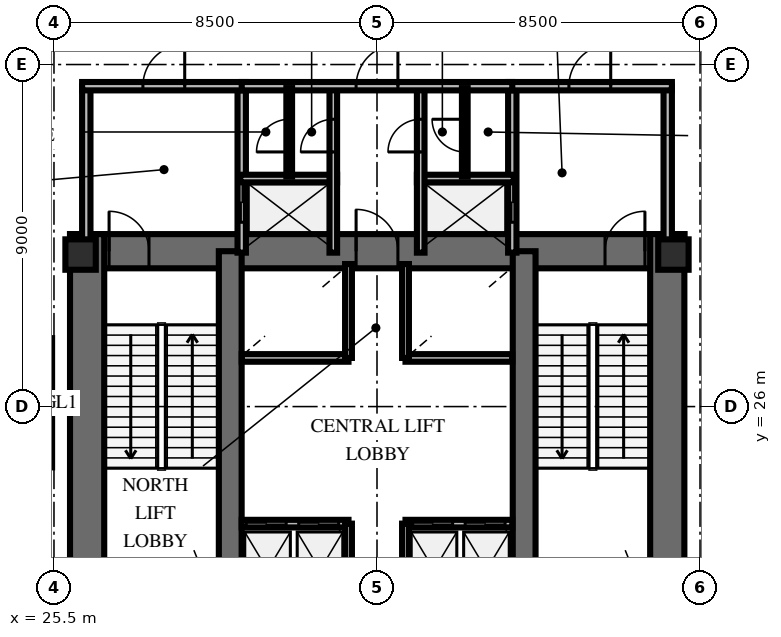
"""IFC4 building model, lengths in metres.
Left out: names, types, materials, properties, quantities, classifications, styles, units other than length and angle.
Written with IfcOpenShell. Run it as: python <this file> out.ifc"""

import sys

from ifc_helpers import new_model, si_unit, direction, frame, frame_2d, origin, origin_2d, place, context, subcontext, project, spatial, rectangle, extrude, element, fill, save


model = new_model("IFC4")
c1 = context("Model", 3, precision=1e-05, world=origin(), true_north=direction((0.0, 1.0)))
c2 = subcontext(c1, "Body", "Model", "MODEL_VIEW")
j1 = project(units=[si_unit("LENGTHUNIT", "METRE"), si_unit("PLANEANGLEUNIT", "RADIAN")], contexts=[c1])
p1 = place(None, origin())
s1 = spatial("IfcSite", under=j1, at=p1, CompositionType="ELEMENT")
p2 = place(p1, origin())
s2 = spatial("IfcBuilding", under=s1, at=p2, CompositionType="ELEMENT")
p3 = place(p2, frame((0.0, 0.0, 25.2)))
s3 = spatial("IfcBuildingStorey", under=s2, at=p3, CompositionType="ELEMENT", Elevation=25.2)
p4 = place(p3, frame((25.922, 30.088, 0.0), z_axis=(0.0, 0.0, 1.0), x_axis=(1.0, 0.0, 0.0)))
e1 = element("IfcWall", 1, at=p4, inside=s3, PredefinedType="SHEAR", context=c2, shape_type="SweptSolid", body=[
    extrude(rectangle(XDim=16.166, YDim=0.9, at=frame_2d((8.083, 0.0))), origin(), (0.0, 0.0, 1.0), 4.8),
])
p5 = place(p4, frame((1.028, 0.0, 0.0)))
e2 = element("IfcOpeningElement", 2, at=p5, cuts=e1, PredefinedType="OPENING", context=c2, shape_type="SweptSolid", body=[
    extrude(rectangle(XDim=1.05, YDim=2.15, at=frame_2d((0.525, 1.075))), frame((0.0, 0.46, 0.0), z_axis=(0.0, -1.0, 0.0), x_axis=(1.0, 0.0, 0.0)), (0.0, 0.0, 1.0), 0.92),
])
p6 = place(p4, frame((14.078, 0.0, 0.0)))
e3 = element("IfcOpeningElement", 3, at=p6, cuts=e1, PredefinedType="OPENING", context=c2, shape_type="SweptSolid", body=[
    extrude(rectangle(XDim=1.05, YDim=2.15, at=frame_2d((0.525, 1.075))), frame((0.0, 0.46, 0.0), z_axis=(0.0, -1.0, 0.0), x_axis=(1.0, 0.0, 0.0)), (0.0, 0.0, 1.0), 0.92),
])
p7 = place(p4, frame((7.528, 0.0, 0.0)))
e4 = element("IfcOpeningElement", 4, at=p7, cuts=e1, PredefinedType="OPENING", context=c2, shape_type="SweptSolid", body=[
    extrude(rectangle(XDim=1.1, YDim=2.15, at=frame_2d((0.55, 1.075))), frame((0.0, 0.46, 0.0), z_axis=(0.0, -1.0, 0.0), x_axis=(1.0, 0.0, 0.0)), (0.0, 0.0, 1.0), 0.92),
])
for number, where, z_axis, x_axis in (
    (5, (26.372, 19.662, 0.0), (0.0, 0.0, 1.0), (0.0, 1.0, 0.0)),
    (6, (41.638, 19.662, 0.0), (0.0, 0.0, 1.0), (0.0, 1.0, 0.0)),
):
    element("IfcWall", number, at=place(p3, frame(where, z_axis=z_axis, x_axis=x_axis)), inside=s3, PredefinedType="SHEAR", context=c2, shape_type="SweptSolid", body=[
        extrude(rectangle(XDim=10.876, YDim=0.9, at=frame_2d((5.438, 0.0))), origin(), (0.0, 0.0, 1.0), 4.8),
    ])
for number, where, z_axis, x_axis in (
    (7, (30.138, 20.112, 0.0), (0.0, 0.0, 1.0), (0.0, 1.0, 0.0)),
    (8, (37.872, 20.112, 0.0), (0.0, 0.0, 1.0), (0.0, 1.0, 0.0)),
):
    element("IfcWall", number, at=place(p3, frame(where, z_axis=z_axis, x_axis=x_axis)), inside=s3, PredefinedType="SHEAR", context=c2, shape_type="SweptSolid", body=[
        extrude(rectangle(XDim=9.976, YDim=0.6, at=frame_2d((4.988, 0.0))), origin(), (0.0, 0.0, 1.0), 4.8),
    ])
for number, where, z_axis, x_axis in (
    (9, (26.2, 30.0, 0.0), (0.0, 0.0, 1.0), (1.0, 0.0, 0.0)),
    (10, (41.8, 30.0, 0.0), (0.0, 0.0, 1.0), (1.0, 0.0, 0.0)),
):
    element("IfcColumn", number, at=place(p3, frame(where, z_axis=z_axis, x_axis=x_axis)), inside=s3, PredefinedType="PILASTER", context=c2, shape_type="SweptSolid", body=[
        extrude(rectangle(XDim=0.8, YDim=0.8, at=origin_2d()), origin(), (0.0, 0.0, 1.0), 4.8),
    ])
p8 = place(p3, frame((26.35, 30.05, 0.0), z_axis=(0.0, 0.0, 1.0), x_axis=(0.0, 1.0, 0.0)))
e11 = element("IfcWall", 11, at=p8, inside=s3, PredefinedType="SOLIDWALL", context=c2, shape_type="SweptSolid", body=[
    extrude(rectangle(XDim=4.38, YDim=0.22, at=frame_2d((2.19, 0.0))), origin(), (0.0, 0.0, 1.0), 3.6),
])
p9 = place(p3, frame((30.44, 30.05, 0.0), z_axis=(0.0, 0.0, 1.0), x_axis=(0.0, 1.0, 0.0)))
e12 = element("IfcWall", 12, at=p9, inside=s3, PredefinedType="SOLIDWALL", context=c2, shape_type="SweptSolid", body=[
    extrude(rectangle(XDim=4.38, YDim=0.22, at=frame_2d((2.19, 0.0))), origin(), (0.0, 0.0, 1.0), 3.6),
])
p10 = place(p9, frame((0.8, 0.0, 0.0)))
e13 = element("IfcOpeningElement", 13, at=p10, cuts=e12, PredefinedType="OPENING", context=c2, shape_type="SweptSolid", body=[
    extrude(rectangle(XDim=1.05, YDim=2.1, at=frame_2d((0.525, 1.05))), frame((0.0, 0.12, 0.0), z_axis=(0.0, -1.0, 0.0), x_axis=(1.0, 0.0, 0.0)), (0.0, 0.0, 1.0), 0.24),
])
p11 = place(p3, frame((26.24, 34.43, 0.0), z_axis=(0.0, 0.0, 1.0), x_axis=(1.0, 0.0, 0.0)))
e14 = element("IfcWall", 14, at=p11, inside=s3, PredefinedType="SOLIDWALL", context=c2, shape_type="SweptSolid", body=[
    extrude(rectangle(XDim=4.31, YDim=0.22, at=frame_2d((2.155, 0.0))), origin(), (0.0, 0.0, 1.0), 3.6),
])
p12 = place(p11, frame((1.6, 0.0, 0.0)))
e15 = element("IfcOpeningElement", 15, at=p12, cuts=e14, PredefinedType="OPENING", context=c2, shape_type="SweptSolid", body=[
    extrude(rectangle(XDim=1.1, YDim=2.15, at=frame_2d((0.55, 1.075))), frame((0.0, 0.12, 0.0), z_axis=(0.0, -1.0, 0.0), x_axis=(1.0, 0.0, 0.0)), (0.0, 0.0, 1.0), 0.24),
])
p13 = place(p3, frame((30.4, 32.0, 0.0), z_axis=(0.0, 0.0, 1.0), x_axis=(1.0, 0.0, 0.0)))
e16 = element("IfcWall", 16, at=p13, inside=s3, PredefinedType="SOLIDWALL", context=c2, shape_type="SweptSolid", body=[
    extrude(rectangle(XDim=2.55, YDim=0.2, at=frame_2d((1.275, 0.0))), origin(), (0.0, 0.0, 1.0), 3.6),
])
p14 = place(p3, frame((32.85, 30.05, 0.0), z_axis=(0.0, 0.0, 1.0), x_axis=(0.0, 1.0, 0.0)))
e17 = element("IfcWall", 17, at=p14, inside=s3, PredefinedType="SOLIDWALL", context=c2, shape_type="SweptSolid", body=[
    extrude(rectangle(XDim=4.38, YDim=0.2, at=frame_2d((2.19, 0.0))), origin(), (0.0, 0.0, 1.0), 3.6),
])
p15 = place(p14, frame((2.65, 0.0, 0.0)))
e18 = element("IfcOpeningElement", 18, at=p15, cuts=e17, PredefinedType="OPENING", context=c2, shape_type="SweptSolid", body=[
    extrude(rectangle(XDim=0.86, YDim=2.05, at=frame_2d((0.43, 1.025))), frame((0.0, 0.11, 0.0), z_axis=(0.0, -1.0, 0.0), x_axis=(1.0, 0.0, 0.0)), (0.0, 0.0, 1.0), 0.22),
])
p16 = place(p3, frame((37.56, 30.05, 0.0), z_axis=(0.0, 0.0, 1.0), x_axis=(0.0, 1.0, 0.0)))
e19 = element("IfcWall", 19, at=p16, inside=s3, PredefinedType="SOLIDWALL", context=c2, shape_type="SweptSolid", body=[
    extrude(rectangle(XDim=4.38, YDim=0.22, at=frame_2d((2.19, 0.0))), origin(), (0.0, 0.0, 1.0), 3.6),
])
p17 = place(p16, frame((0.8, 0.0, 0.0)))
e20 = element("IfcOpeningElement", 20, at=p17, cuts=e19, PredefinedType="OPENING", context=c2, shape_type="SweptSolid", body=[
    extrude(rectangle(XDim=1.05, YDim=2.1, at=frame_2d((0.525, 1.05))), frame((0.0, 0.12, 0.0), z_axis=(0.0, -1.0, 0.0), x_axis=(1.0, 0.0, 0.0)), (0.0, 0.0, 1.0), 0.24),
])
p18 = place(p3, frame((41.65, 30.05, 0.0), z_axis=(0.0, 0.0, 1.0), x_axis=(0.0, 1.0, 0.0)))
e21 = element("IfcWall", 21, at=p18, inside=s3, PredefinedType="SOLIDWALL", context=c2, shape_type="SweptSolid", body=[
    extrude(rectangle(XDim=4.38, YDim=0.22, at=frame_2d((2.19, 0.0))), origin(), (0.0, 0.0, 1.0), 3.6),
])
p19 = place(p3, frame((37.45, 34.43, 0.0), z_axis=(0.0, 0.0, 1.0), x_axis=(1.0, 0.0, 0.0)))
e22 = element("IfcWall", 22, at=p19, inside=s3, PredefinedType="SOLIDWALL", context=c2, shape_type="SweptSolid", body=[
    extrude(rectangle(XDim=4.31, YDim=0.22, at=frame_2d((2.155, 0.0))), origin(), (0.0, 0.0, 1.0), 3.6),
])
p20 = place(p19, frame((1.6, 0.0, 0.0)))
e23 = element("IfcOpeningElement", 23, at=p20, cuts=e22, PredefinedType="OPENING", context=c2, shape_type="SweptSolid", body=[
    extrude(rectangle(XDim=1.1, YDim=2.15, at=frame_2d((0.55, 1.075))), frame((0.0, 0.12, 0.0), z_axis=(0.0, -1.0, 0.0), x_axis=(1.0, 0.0, 0.0)), (0.0, 0.0, 1.0), 0.24),
])
p21 = place(p3, frame((35.05, 32.0, 0.0), z_axis=(0.0, 0.0, 1.0), x_axis=(1.0, 0.0, 0.0)))
e24 = element("IfcWall", 24, at=p21, inside=s3, PredefinedType="SOLIDWALL", context=c2, shape_type="SweptSolid", body=[
    extrude(rectangle(XDim=2.55, YDim=0.2, at=frame_2d((1.275, 0.0))), origin(), (0.0, 0.0, 1.0), 3.6),
])
p22 = place(p3, frame((35.15, 30.05, 0.0), z_axis=(0.0, 0.0, 1.0), x_axis=(0.0, 1.0, 0.0)))
e25 = element("IfcWall", 25, at=p22, inside=s3, PredefinedType="SOLIDWALL", context=c2, shape_type="SweptSolid", body=[
    extrude(rectangle(XDim=4.38, YDim=0.2, at=frame_2d((2.19, 0.0))), origin(), (0.0, 0.0, 1.0), 3.6),
])
p23 = place(p22, frame((2.65, 0.0, 0.0)))
e26 = element("IfcOpeningElement", 26, at=p23, cuts=e25, PredefinedType="OPENING", context=c2, shape_type="SweptSolid", body=[
    extrude(rectangle(XDim=0.86, YDim=2.05, at=frame_2d((0.43, 1.025))), frame((0.0, 0.11, 0.0), z_axis=(0.0, -1.0, 0.0), x_axis=(1.0, 0.0, 0.0)), (0.0, 0.0, 1.0), 0.22),
])
p24 = place(p3, frame((30.44, 34.43, 0.0), z_axis=(0.0, 0.0, 1.0), x_axis=(1.0, 0.0, 0.0)))
e27 = element("IfcWall", 27, at=p24, inside=s3, PredefinedType="SOLIDWALL", context=c2, shape_type="SweptSolid", body=[
    extrude(rectangle(XDim=7.12, YDim=0.22, at=frame_2d((3.56, 0.0))), origin(), (0.0, 0.0, 1.0), 3.6),
])
p25 = place(p24, frame((3.01, 0.0, 0.0)))
e28 = element("IfcOpeningElement", 28, at=p25, cuts=e27, PredefinedType="OPENING", context=c2, shape_type="SweptSolid", body=[
    extrude(rectangle(XDim=1.1, YDim=2.15, at=frame_2d((0.55, 1.075))), frame((0.0, 0.12, 0.0), z_axis=(0.0, -1.0, 0.0), x_axis=(1.0, 0.0, 0.0)), (0.0, 0.0, 1.0), 0.24),
])
p26 = place(p3, frame((31.69, 32.05, 0.0), z_axis=(0.0, 0.0, 1.0), x_axis=(0.0, 1.0, 0.0)))
e29 = element("IfcWall", 29, at=p26, inside=s3, PredefinedType="PARTITIONING", context=c2, shape_type="SweptSolid", body=[
    extrude(rectangle(XDim=2.33, YDim=0.15, at=frame_2d((1.165, 0.0))), origin(), (0.0, 0.0, 1.0), 3.6),
])
p27 = place(p26, frame((0.65, 0.0, 0.0)))
e30 = element("IfcOpeningElement", 30, at=p27, cuts=e29, PredefinedType="OPENING", context=c2, shape_type="SweptSolid", body=[
    extrude(rectangle(XDim=0.86, YDim=2.05, at=frame_2d((0.43, 1.025))), frame((0.0, 0.085, 0.0), z_axis=(0.0, -1.0, 0.0), x_axis=(1.0, 0.0, 0.0)), (0.0, 0.0, 1.0), 0.17),
])
p28 = place(p3, frame((36.31, 32.05, 0.0), z_axis=(0.0, 0.0, 1.0), x_axis=(0.0, 1.0, 0.0)))
e31 = element("IfcWall", 31, at=p28, inside=s3, PredefinedType="PARTITIONING", context=c2, shape_type="SweptSolid", body=[
    extrude(rectangle(XDim=2.33, YDim=0.15, at=frame_2d((1.165, 0.0))), origin(), (0.0, 0.0, 1.0), 3.6),
])
p29 = place(p28, frame((0.65, 0.0, 0.0)))
e32 = element("IfcOpeningElement", 32, at=p29, cuts=e31, PredefinedType="OPENING", context=c2, shape_type="SweptSolid", body=[
    extrude(rectangle(XDim=0.86, YDim=2.05, at=frame_2d((0.43, 1.025))), frame((0.0, 0.085, 0.0), z_axis=(0.0, -1.0, 0.0), x_axis=(1.0, 0.0, 0.0)), (0.0, 0.0, 1.0), 0.17),
])
p30 = place(p3, frame((30.44, 22.92, 0.0), z_axis=(0.0, 0.0, 1.0), x_axis=(1.0, 0.0, 0.0)))
e33 = element("IfcWall", 33, at=p30, inside=s3, PredefinedType="SOLIDWALL", context=c2, shape_type="SweptSolid", body=[
    extrude(rectangle(XDim=2.81, YDim=0.2, at=frame_2d((1.405, 0.0))), origin(), (0.0, 0.0, 1.0), 3.6),
])
p31 = place(p30, frame((0.12, 0.0, 0.0)))
e34 = element("IfcOpeningElement", 34, at=p31, cuts=e33, PredefinedType="OPENING", context=c2, shape_type="SweptSolid", body=[
    extrude(rectangle(XDim=1.05, YDim=2.1, at=frame_2d((0.525, 1.05))), frame((0.0, 0.11, 0.0), z_axis=(0.0, -1.0, 0.0), x_axis=(1.0, 0.0, 0.0)), (0.0, 0.0, 1.0), 0.22),
])
p32 = place(p30, frame((1.5, 0.0, 0.0)))
e35 = element("IfcOpeningElement", 35, at=p32, cuts=e33, PredefinedType="OPENING", context=c2, shape_type="SweptSolid", body=[
    extrude(rectangle(XDim=1.05, YDim=2.1, at=frame_2d((0.525, 1.05))), frame((0.0, 0.11, 0.0), z_axis=(0.0, -1.0, 0.0), x_axis=(1.0, 0.0, 0.0)), (0.0, 0.0, 1.0), 0.22),
])
p33 = place(p3, frame((33.25, 20.5, 0.0), z_axis=(0.0, 0.0, 1.0), x_axis=(0.0, 1.0, 0.0)))
e36 = element("IfcWall", 36, at=p33, inside=s3, PredefinedType="SOLIDWALL", context=c2, shape_type="SweptSolid", body=[
    extrude(rectangle(XDim=2.42, YDim=0.18, at=frame_2d((1.21, 0.0))), origin(), (0.0, 0.0, 1.0), 3.6),
])
p34 = place(p3, frame((34.75, 22.92, 0.0), z_axis=(0.0, 0.0, 1.0), x_axis=(1.0, 0.0, 0.0)))
e37 = element("IfcWall", 37, at=p34, inside=s3, PredefinedType="SOLIDWALL", context=c2, shape_type="SweptSolid", body=[
    extrude(rectangle(XDim=2.81, YDim=0.2, at=frame_2d((1.405, 0.0))), origin(), (0.0, 0.0, 1.0), 3.6),
])
p35 = place(p34, frame((0.19, 0.0, 0.0)))
e38 = element("IfcOpeningElement", 38, at=p35, cuts=e37, PredefinedType="OPENING", context=c2, shape_type="SweptSolid", body=[
    extrude(rectangle(XDim=1.05, YDim=2.1, at=frame_2d((0.525, 1.05))), frame((0.0, 0.11, 0.0), z_axis=(0.0, -1.0, 0.0), x_axis=(1.0, 0.0, 0.0)), (0.0, 0.0, 1.0), 0.22),
])
p36 = place(p34, frame((1.57, 0.0, 0.0)))
e39 = element("IfcOpeningElement", 39, at=p36, cuts=e37, PredefinedType="OPENING", context=c2, shape_type="SweptSolid", body=[
    extrude(rectangle(XDim=1.05, YDim=2.1, at=frame_2d((0.525, 1.05))), frame((0.0, 0.11, 0.0), z_axis=(0.0, -1.0, 0.0), x_axis=(1.0, 0.0, 0.0)), (0.0, 0.0, 1.0), 0.22),
])
p37 = place(p3, frame((34.75, 20.5, 0.0), z_axis=(0.0, 0.0, 1.0), x_axis=(0.0, 1.0, 0.0)))
e40 = element("IfcWall", 40, at=p37, inside=s3, PredefinedType="SOLIDWALL", context=c2, shape_type="SweptSolid", body=[
    extrude(rectangle(XDim=2.42, YDim=0.18, at=frame_2d((1.21, 0.0))), origin(), (0.0, 0.0, 1.0), 3.6),
])
p38 = place(p3, frame((30.44, 27.28, 0.0), z_axis=(0.0, 0.0, 1.0), x_axis=(1.0, 0.0, 0.0)))
e41 = element("IfcWall", 41, at=p38, inside=s3, PredefinedType="SOLIDWALL", context=c2, shape_type="SweptSolid", body=[
    extrude(rectangle(XDim=2.81, YDim=0.2, at=frame_2d((1.405, 0.0))), origin(), (0.0, 0.0, 1.0), 3.6),
])
p39 = place(p3, frame((33.25, 27.28, 0.0), z_axis=(0.0, 0.0, 1.0), x_axis=(0.0, 1.0, 0.0)))
e42 = element("IfcWall", 42, at=p39, inside=s3, PredefinedType="SOLIDWALL", context=c2, shape_type="SweptSolid", body=[
    extrude(rectangle(XDim=2.47, YDim=0.18, at=frame_2d((1.235, 0.0))), origin(), (0.0, 0.0, 1.0), 3.6),
])
p40 = place(p3, frame((34.75, 27.28, 0.0), z_axis=(0.0, 0.0, 1.0), x_axis=(1.0, 0.0, 0.0)))
e43 = element("IfcWall", 43, at=p40, inside=s3, PredefinedType="SOLIDWALL", context=c2, shape_type="SweptSolid", body=[
    extrude(rectangle(XDim=2.81, YDim=0.2, at=frame_2d((1.405, 0.0))), origin(), (0.0, 0.0, 1.0), 3.6),
])
p41 = place(p3, frame((34.75, 27.28, 0.0), z_axis=(0.0, 0.0, 1.0), x_axis=(0.0, 1.0, 0.0)))
e44 = element("IfcWall", 44, at=p41, inside=s3, PredefinedType="SOLIDWALL", context=c2, shape_type="SweptSolid", body=[
    extrude(rectangle(XDim=2.47, YDim=0.18, at=frame_2d((1.235, 0.0))), origin(), (0.0, 0.0, 1.0), 3.6),
])
p42 = place(p5, origin())
e45 = element("IfcDoor", 45, at=p42, inside=s3, OperationType="SINGLE_SWING_LEFT", PredefinedType="DOOR", context=c2, shape_type="SweptSolid", body=[
    extrude(rectangle(XDim=1.05, YDim=2.15, at=frame_2d((0.525, 1.075))), frame((0.0, 0.025, 0.0), z_axis=(0.0, -1.0, 0.0), x_axis=(1.0, 0.0, 0.0)), (0.0, 0.0, 1.0), 0.05),
])
fill(e2, e45)
p43 = place(p6, origin())
e46 = element("IfcDoor", 46, at=p43, inside=s3, OperationType="SINGLE_SWING_RIGHT", PredefinedType="DOOR", context=c2, shape_type="SweptSolid", body=[
    extrude(rectangle(XDim=1.05, YDim=2.15, at=frame_2d((0.525, 1.075))), frame((0.0, 0.025, 0.0), z_axis=(0.0, -1.0, 0.0), x_axis=(1.0, 0.0, 0.0)), (0.0, 0.0, 1.0), 0.05),
])
fill(e3, e46)
p44 = place(p7, origin())
e47 = element("IfcDoor", 47, at=p44, inside=s3, OperationType="SINGLE_SWING_LEFT", PredefinedType="DOOR", context=c2, shape_type="SweptSolid", body=[
    extrude(rectangle(XDim=1.1, YDim=2.15, at=frame_2d((0.55, 1.075))), frame((0.0, 0.025, 0.0), z_axis=(0.0, -1.0, 0.0), x_axis=(1.0, 0.0, 0.0)), (0.0, 0.0, 1.0), 0.05),
])
fill(e4, e47)
p45 = place(p12, origin())
e48 = element("IfcDoor", 48, at=p45, inside=s3, OperationType="SINGLE_SWING_RIGHT", PredefinedType="DOOR", context=c2, shape_type="SweptSolid", body=[
    extrude(rectangle(XDim=1.1, YDim=2.15, at=frame_2d((0.55, 1.075))), frame((0.0, 0.025, 0.0), z_axis=(0.0, -1.0, 0.0), x_axis=(1.0, 0.0, 0.0)), (0.0, 0.0, 1.0), 0.05),
])
fill(e15, e48)
p46 = place(p10, origin())
e49 = element("IfcDoor", 49, at=p46, inside=s3, OperationType="DOUBLE_DOOR_SLIDING", PredefinedType="USERDEFINED", context=c2, shape_type="SweptSolid", body=[
    extrude(rectangle(XDim=1.05, YDim=2.1, at=frame_2d((0.525, 1.05))), frame((0.0, 0.025, 0.0), z_axis=(0.0, -1.0, 0.0), x_axis=(1.0, 0.0, 0.0)), (0.0, 0.0, 1.0), 0.05),
])
fill(e13, e49)
p47 = place(p15, origin())
e50 = element("IfcDoor", 50, at=p47, inside=s3, OperationType="SINGLE_SWING_LEFT", PredefinedType="TRAPDOOR", context=c2, shape_type="SweptSolid", body=[
    extrude(rectangle(XDim=0.86, YDim=2.05, at=frame_2d((0.43, 1.025))), frame((0.0, 0.025, 0.0), z_axis=(0.0, -1.0, 0.0), x_axis=(1.0, 0.0, 0.0)), (0.0, 0.0, 1.0), 0.05),
])
fill(e18, e50)
p48 = place(p20, origin())
e51 = element("IfcDoor", 51, at=p48, inside=s3, OperationType="SINGLE_SWING_RIGHT", PredefinedType="DOOR", context=c2, shape_type="SweptSolid", body=[
    extrude(rectangle(XDim=1.1, YDim=2.15, at=frame_2d((0.55, 1.075))), frame((0.0, 0.025, 0.0), z_axis=(0.0, -1.0, 0.0), x_axis=(1.0, 0.0, 0.0)), (0.0, 0.0, 1.0), 0.05),
])
fill(e23, e51)
p49 = place(p17, origin())
e52 = element("IfcDoor", 52, at=p49, inside=s3, OperationType="DOUBLE_DOOR_SLIDING", PredefinedType="USERDEFINED", context=c2, shape_type="SweptSolid", body=[
    extrude(rectangle(XDim=1.05, YDim=2.1, at=frame_2d((0.525, 1.05))), frame((0.0, 0.025, 0.0), z_axis=(0.0, -1.0, 0.0), x_axis=(1.0, 0.0, 0.0)), (0.0, 0.0, 1.0), 0.05),
])
fill(e20, e52)
p50 = place(p23, origin())
e53 = element("IfcDoor", 53, at=p50, inside=s3, OperationType="SINGLE_SWING_LEFT", PredefinedType="TRAPDOOR", context=c2, shape_type="SweptSolid", body=[
    extrude(rectangle(XDim=0.86, YDim=2.05, at=frame_2d((0.43, 1.025))), frame((0.0, 0.025, 0.0), z_axis=(0.0, -1.0, 0.0), x_axis=(1.0, 0.0, 0.0)), (0.0, 0.0, 1.0), 0.05),
])
fill(e26, e53)
p51 = place(p25, origin())
e54 = element("IfcDoor", 54, at=p51, inside=s3, OperationType="SINGLE_SWING_RIGHT", PredefinedType="DOOR", context=c2, shape_type="SweptSolid", body=[
    extrude(rectangle(XDim=1.1, YDim=2.15, at=frame_2d((0.55, 1.075))), frame((0.0, 0.025, 0.0), z_axis=(0.0, -1.0, 0.0), x_axis=(1.0, 0.0, 0.0)), (0.0, 0.0, 1.0), 0.05),
])
fill(e28, e54)
p52 = place(p27, origin())
e55 = element("IfcDoor", 55, at=p52, inside=s3, OperationType="SINGLE_SWING_LEFT", PredefinedType="TRAPDOOR", context=c2, shape_type="SweptSolid", body=[
    extrude(rectangle(XDim=0.86, YDim=2.05, at=frame_2d((0.43, 1.025))), frame((0.0, 0.025, 0.0), z_axis=(0.0, -1.0, 0.0), x_axis=(1.0, 0.0, 0.0)), (0.0, 0.0, 1.0), 0.05),
])
fill(e30, e55)
p53 = place(p29, origin())
e56 = element("IfcDoor", 56, at=p53, inside=s3, OperationType="SINGLE_SWING_RIGHT", PredefinedType="TRAPDOOR", context=c2, shape_type="SweptSolid", body=[
    extrude(rectangle(XDim=0.86, YDim=2.05, at=frame_2d((0.43, 1.025))), frame((0.0, 0.025, 0.0), z_axis=(0.0, -1.0, 0.0), x_axis=(1.0, 0.0, 0.0)), (0.0, 0.0, 1.0), 0.05),
])
fill(e32, e56)
p54 = place(p31, origin())
e57 = element("IfcDoor", 57, at=p54, inside=s3, OperationType="DOUBLE_DOOR_SLIDING", PredefinedType="USERDEFINED", context=c2, shape_type="SweptSolid", body=[
    extrude(rectangle(XDim=1.05, YDim=2.1, at=frame_2d((0.525, 1.05))), frame((0.0, 0.025, 0.0), z_axis=(0.0, -1.0, 0.0), x_axis=(1.0, 0.0, 0.0)), (0.0, 0.0, 1.0), 0.05),
])
fill(e34, e57)
p55 = place(p32, origin())
e58 = element("IfcDoor", 58, at=p55, inside=s3, OperationType="DOUBLE_DOOR_SLIDING", PredefinedType="USERDEFINED", context=c2, shape_type="SweptSolid", body=[
    extrude(rectangle(XDim=1.05, YDim=2.1, at=frame_2d((0.525, 1.05))), frame((0.0, 0.025, 0.0), z_axis=(0.0, -1.0, 0.0), x_axis=(1.0, 0.0, 0.0)), (0.0, 0.0, 1.0), 0.05),
])
fill(e35, e58)
p56 = place(p35, origin())
e59 = element("IfcDoor", 59, at=p56, inside=s3, OperationType="DOUBLE_DOOR_SLIDING", PredefinedType="USERDEFINED", context=c2, shape_type="SweptSolid", body=[
    extrude(rectangle(XDim=1.05, YDim=2.1, at=frame_2d((0.525, 1.05))), frame((0.0, 0.025, 0.0), z_axis=(0.0, -1.0, 0.0), x_axis=(1.0, 0.0, 0.0)), (0.0, 0.0, 1.0), 0.05),
])
fill(e38, e59)
p57 = place(p36, origin())
e60 = element("IfcDoor", 60, at=p57, inside=s3, OperationType="DOUBLE_DOOR_SLIDING", PredefinedType="USERDEFINED", context=c2, shape_type="SweptSolid", body=[
    extrude(rectangle(XDim=1.05, YDim=2.1, at=frame_2d((0.525, 1.05))), frame((0.0, 0.025, 0.0), z_axis=(0.0, -1.0, 0.0), x_axis=(1.0, 0.0, 0.0)), (0.0, 0.0, 1.0), 0.05),
])
fill(e39, e60)
save(model, sys.argv[1])
